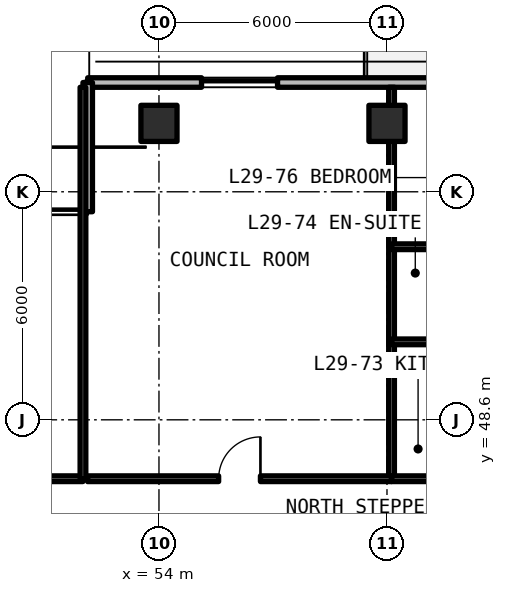
"""IFC4 building model, lengths in metres.
Left out: names, types, materials, properties, quantities, classifications, styles, units other than length and angle.
Written with IfcOpenShell. Run it as: python <this file> out.ifc"""

import sys

from ifc_helpers import new_model, si_unit, direction, frame, frame_2d, origin, origin_2d, place, context, subcontext, project, spatial, rectangle, extrude, element, fill, save


model = new_model("IFC4")
c1 = context("Model", 3, precision=1e-05, world=origin(), true_north=direction((0.0, 1.0)))
c2 = subcontext(c1, "Body", "Model", "MODEL_VIEW")
j1 = project(units=[si_unit("LENGTHUNIT", "METRE"), si_unit("PLANEANGLEUNIT", "RADIAN")], contexts=[c1])
p1 = place(None, origin())
s1 = spatial("IfcSite", under=j1, at=p1, CompositionType="ELEMENT")
p2 = place(p1, origin())
s2 = spatial("IfcBuilding", under=s1, at=p2, CompositionType="ELEMENT")
p3 = place(p2, frame((0.0, 0.0, 105.27)))
s3 = spatial("IfcBuildingStorey", under=s2, at=p3, CompositionType="ELEMENT", Elevation=105.27)
for number, where, z_axis, x_axis in (
    (1, (54.0, 56.4, 0.0), (0.0, 0.0, 1.0), (1.0, 0.0, 0.0)),
    (2, (60.0, 56.4, 0.0), (0.0, 0.0, 1.0), (1.0, 0.0, 0.0)),
):
    element("IfcColumn", number, at=place(p3, frame(where, z_axis=z_axis, x_axis=x_axis)), inside=s3, PredefinedType="COLUMN", context=c2, shape_type="SweptSolid", body=[
        extrude(rectangle(XDim=0.95, YDim=0.95, at=origin_2d()), origin(), (0.0, 0.0, 1.0), 3.3),
    ])
p4 = place(p3, frame((96.148, 57.475, 0.0), z_axis=(0.0, 0.0, 1.0), x_axis=(-1.0, 0.0, 0.0)))
e3 = element("IfcWall", 3, at=p4, inside=s3, PredefinedType="SOLIDWALL", context=c2, shape_type="SweptSolid", body=[
    extrude(rectangle(XDim=44.023, YDim=0.25, at=frame_2d((22.012, 0.0))), origin(), (0.0, 0.0, 1.0), 3.08),
])
p5 = place(p4, frame((31.848, 0.0, 0.0)))
e4 = element("IfcOpeningElement", 4, at=p5, cuts=e3, PredefinedType="OPENING", context=c2, shape_type="SweptSolid", body=[
    extrude(rectangle(XDim=1.1, YDim=2.15, at=frame_2d((0.55, 1.075))), frame((0.0, 0.135, 0.0), z_axis=(0.0, -1.0, 0.0), x_axis=(1.0, 0.0, 0.0)), (0.0, 0.0, 1.0), 0.27),
])
p6 = place(p4, frame((19.798, 0.0, 0.0)))
e5 = element("IfcOpeningElement", 5, at=p6, cuts=e3, PredefinedType="OPENING", context=c2, shape_type="SweptSolid", body=[
    extrude(rectangle(XDim=1.1, YDim=2.15, at=frame_2d((0.55, 1.075))), frame((0.0, 0.135, 0.0), z_axis=(0.0, -1.0, 0.0), x_axis=(1.0, 0.0, 0.0)), (0.0, 0.0, 1.0), 0.27),
])
p7 = place(p4, frame((8.398, 0.0, 0.0)))
e6 = element("IfcOpeningElement", 6, at=p7, cuts=e3, PredefinedType="OPENING", context=c2, shape_type="SweptSolid", body=[
    extrude(rectangle(XDim=1.1, YDim=2.15, at=frame_2d((0.55, 1.075))), frame((0.0, 0.135, 0.0), z_axis=(0.0, -1.0, 0.0), x_axis=(1.0, 0.0, 0.0)), (0.0, 0.0, 1.0), 0.27),
])
p8 = place(p4, frame((39.028, 0.0, 0.78)))
e7 = element("IfcOpeningElement", 7, at=p8, cuts=e3, PredefinedType="OPENING", context=c2, shape_type="SweptSolid", body=[
    extrude(rectangle(XDim=2.0, YDim=1.66, at=frame_2d((1.0, 0.83))), frame((0.0, 0.135, 0.0), z_axis=(0.0, -1.0, 0.0), x_axis=(1.0, 0.0, 0.0)), (0.0, 0.0, 1.0), 0.27),
])
p9 = place(p4, frame((25.04, 0.0, 0.78)))
e8 = element("IfcOpeningElement", 8, at=p9, cuts=e3, PredefinedType="OPENING", context=c2, shape_type="SweptSolid", body=[
    extrude(rectangle(XDim=2.0, YDim=1.66, at=frame_2d((1.0, 0.83))), frame((0.0, 0.135, 0.0), z_axis=(0.0, -1.0, 0.0), x_axis=(1.0, 0.0, 0.0)), (0.0, 0.0, 1.0), 0.27),
])
p10 = place(p4, frame((2.664, 0.0, 0.78)))
e9 = element("IfcOpeningElement", 9, at=p10, cuts=e3, PredefinedType="OPENING", context=c2, shape_type="SweptSolid", body=[
    extrude(rectangle(XDim=2.0, YDim=1.66, at=frame_2d((1.0, 0.83))), frame((0.0, 0.135, 0.0), z_axis=(0.0, -1.0, 0.0), x_axis=(1.0, 0.0, 0.0)), (0.0, 0.0, 1.0), 0.27),
])
p11 = place(p3, frame((52.125, 57.475, 0.0), z_axis=(0.0, 0.0, 1.0), x_axis=(0.0, -1.0, 0.0)))
e10 = element("IfcWall", 10, at=p11, inside=s3, PredefinedType="SOLIDWALL", context=c2, shape_type="SweptSolid", body=[
    extrude(rectangle(XDim=3.4, YDim=0.25, at=frame_2d((1.7, 0.0))), origin(), (0.0, 0.0, 1.0), 3.08),
])
p12 = place(p3, frame((43.6, 47.05, 0.0), z_axis=(0.0, 0.0, 1.0), x_axis=(1.0, 0.0, 0.0)))
e11 = element("IfcWall", 11, at=p12, inside=s3, PredefinedType="SOLIDWALL", context=c2, shape_type="SweptSolid", body=[
    extrude(rectangle(XDim=8.4, YDim=0.15, at=frame_2d((4.2, 0.0))), origin(), (0.0, 0.0, 1.0), 2.35),
])
p13 = place(p12, frame((3.65, 0.0, 0.0)))
e12 = element("IfcOpeningElement", 12, at=p13, cuts=e11, PredefinedType="OPENING", context=c2, shape_type="SweptSolid", body=[
    extrude(rectangle(XDim=1.1, YDim=2.15, at=frame_2d((0.55, 1.075))), frame((0.0, 0.085, 0.0), z_axis=(0.0, -1.0, 0.0), x_axis=(1.0, 0.0, 0.0)), (0.0, 0.0, 1.0), 0.17),
])
for number, where, z_axis, x_axis in (
    (13, (52.0, 47.05, 0.0), (0.0, 0.0, 1.0), (0.0, 1.0, 0.0)),
    (14, (60.12, 47.05, 0.0), (0.0, 0.0, 1.0), (0.0, 1.0, 0.0)),
):
    element("IfcWall", number, at=place(p3, frame(where, z_axis=z_axis, x_axis=x_axis)), inside=s3, PredefinedType="SOLIDWALL", context=c2, shape_type="SweptSolid", body=[
        extrude(rectangle(XDim=10.3, YDim=0.15, at=frame_2d((5.15, 0.0))), origin(), (0.0, 0.0, 1.0), 2.35),
    ])
p14 = place(p3, frame((52.12, 47.05, 0.0), z_axis=(0.0, 0.0, 1.0), x_axis=(1.0, 0.0, 0.0)))
e15 = element("IfcWall", 15, at=p14, inside=s3, PredefinedType="SOLIDWALL", context=c2, shape_type="SweptSolid", body=[
    extrude(rectangle(XDim=8.0, YDim=0.15, at=frame_2d((4.0, 0.0))), origin(), (0.0, 0.0, 1.0), 2.35),
])
p15 = place(p14, frame((3.45, 0.0, 0.0)))
e16 = element("IfcOpeningElement", 16, at=p15, cuts=e15, PredefinedType="OPENING", context=c2, shape_type="SweptSolid", body=[
    extrude(rectangle(XDim=1.1, YDim=2.15, at=frame_2d((0.55, 1.075))), frame((0.0, 0.085, 0.0), z_axis=(0.0, -1.0, 0.0), x_axis=(1.0, 0.0, 0.0)), (0.0, 0.0, 1.0), 0.17),
])
p16 = place(p3, frame((60.12, 50.651, 0.0), z_axis=(0.0, 0.0, 1.0), x_axis=(1.0, 0.0, 0.0)))
e17 = element("IfcWall", 17, at=p16, inside=s3, PredefinedType="PARTITIONING", context=c2, shape_type="SweptSolid", body=[
    extrude(rectangle(XDim=2.35, YDim=0.15, at=frame_2d((1.175, 0.0))), origin(), (0.0, 0.0, 1.0), 2.35),
])
p17 = place(p3, frame((60.12, 53.154, 0.0), z_axis=(0.0, 0.0, 1.0), x_axis=(1.0, 0.0, 0.0)))
e18 = element("IfcWall", 18, at=p17, inside=s3, PredefinedType="PARTITIONING", context=c2, shape_type="SweptSolid", body=[
    extrude(rectangle(XDim=7.031, YDim=0.15, at=frame_2d((3.515, 0.0))), origin(), (0.0, 0.0, 1.0), 2.35),
])
p18 = place(p17, frame((4.305, 0.0, 0.0)))
e19 = element("IfcOpeningElement", 19, at=p18, cuts=e18, PredefinedType="OPENING", context=c2, shape_type="SweptSolid", body=[
    extrude(rectangle(XDim=0.85, YDim=2.1, at=frame_2d((0.425, 1.05))), frame((0.0, 0.085, 0.0), z_axis=(0.0, -1.0, 0.0), x_axis=(1.0, 0.0, 0.0)), (0.0, 0.0, 1.0), 0.17),
])
p19 = place(p3, frame((60.12, 47.05, 0.0), z_axis=(0.0, 0.0, 1.0), x_axis=(1.0, 0.0, 0.0)))
e20 = element("IfcWall", 20, at=p19, inside=s3, PredefinedType="SOLIDWALL", context=c2, shape_type="SweptSolid", body=[
    extrude(rectangle(XDim=7.031, YDim=0.15, at=frame_2d((3.515, 0.0))), origin(), (0.0, 0.0, 1.0), 2.35),
])
p20 = place(p19, frame((4.255, 0.0, 0.0)))
e21 = element("IfcOpeningElement", 21, at=p20, cuts=e20, PredefinedType="OPENING", context=c2, shape_type="SweptSolid", body=[
    extrude(rectangle(XDim=0.95, YDim=2.15, at=frame_2d((0.475, 1.075))), frame((0.0, 0.085, 0.0), z_axis=(0.0, -1.0, 0.0), x_axis=(1.0, 0.0, 0.0)), (0.0, 0.0, 1.0), 0.17),
])
p21 = place(p8, origin())
e22 = element("IfcWindow", 22, at=p21, inside=s3, PartitioningType="SINGLE_PANEL", PredefinedType="WINDOW", context=c2, shape_type="SweptSolid", body=[
    extrude(rectangle(XDim=2.0, YDim=1.66, at=frame_2d((1.0, 0.83))), frame((0.0, 0.03, 0.0), z_axis=(0.0, -1.0, 0.0), x_axis=(1.0, 0.0, 0.0)), (0.0, 0.0, 1.0), 0.06),
])
fill(e7, e22)
p22 = place(p15, origin())
e23 = element("IfcDoor", 23, at=p22, inside=s3, OperationType="SINGLE_SWING_RIGHT", PredefinedType="DOOR", context=c2, shape_type="SweptSolid", body=[
    extrude(rectangle(XDim=1.1, YDim=2.15, at=frame_2d((0.55, 1.075))), frame((0.0, 0.025, 0.0), z_axis=(0.0, -1.0, 0.0), x_axis=(1.0, 0.0, 0.0)), (0.0, 0.0, 1.0), 0.05),
])
fill(e16, e23)
save(model, sys.argv[1])
